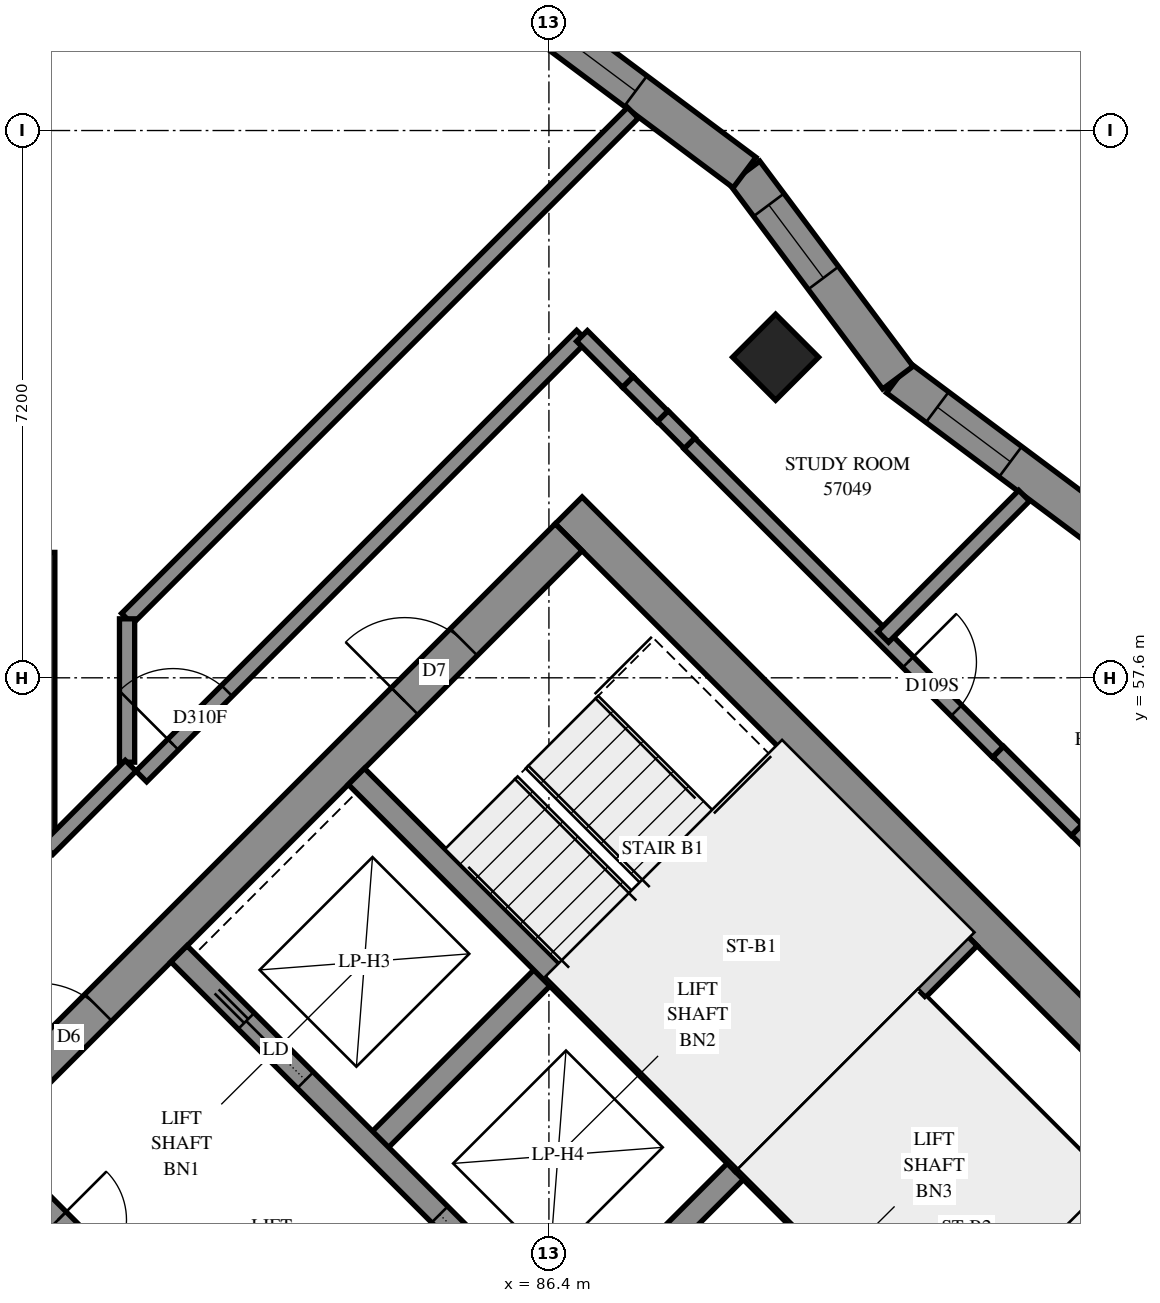
"""IFC4 building model, lengths in metres.
Left out: names, types, materials, properties, quantities, classifications, styles, units other than length and angle.
Written with IfcOpenShell. Run it as: python <this file> out.ifc"""

import sys

from ifc_helpers import new_model, si_unit, direction, frame, frame_2d, origin, origin_2d, place, context, subcontext, project, spatial, polyline, rectangle, outline, extrude, element, fill, save


model = new_model("IFC4")
c1 = context("Model", 3, precision=1e-05, world=origin(), true_north=direction((0.0, 1.0)))
c2 = subcontext(c1, "Body", "Model", "MODEL_VIEW")
j1 = project(units=[si_unit("LENGTHUNIT", "METRE"), si_unit("PLANEANGLEUNIT", "RADIAN")], contexts=[c1])
p1 = place(None, origin())
s1 = spatial("IfcSite", under=j1, at=p1, CompositionType="ELEMENT")
p2 = place(p1, origin())
s2 = spatial("IfcBuilding", under=s1, at=p2, CompositionType="ELEMENT")
p3 = place(p2, frame((0.0, 0.0, 210.0)))
s3 = spatial("IfcBuildingStorey", under=s2, at=p3, CompositionType="ELEMENT", Elevation=210.0)
p4 = place(p3, frame((89.382, 61.818, 0.0), z_axis=(0.0, 0.0, 1.0), x_axis=(0.7071067812, -0.7071067812, 0.0)))
e1 = element("IfcColumn", 1, at=p4, inside=s3, PredefinedType="COLUMN", context=c2, shape_type="SweptSolid", body=[
    extrude(rectangle(XDim=0.8, YDim=0.8, at=origin_2d()), origin(), (0.0, 0.0, 1.0), 3.1),
])
p5 = place(p3, frame((86.66, 59.802, -0.3), z_axis=(0.0, 0.0, 1.0), x_axis=(0.7071067812, -0.7071067812, 0.0)))
e2 = element("IfcWall", 2, at=p5, inside=s3, PredefinedType="SHEAR", context=c2, shape_type="SweptSolid", body=[
    extrude(rectangle(XDim=15.4, YDim=0.5, at=frame_2d((7.7, 0.0))), origin(), (0.0, 0.0, 1.0), 2.7),
])
p6 = place(p5, frame((10.5, 0.0, 0.3)))
e3 = element("IfcOpeningElement", 3, at=p6, cuts=e2, PredefinedType="OPENING", context=c2, shape_type="SweptSolid", body=[
    extrude(rectangle(XDim=0.8, YDim=2.1, at=frame_2d((0.4, 1.05))), frame((0.0, 0.26, 0.0), z_axis=(0.0, -1.0, 0.0), x_axis=(1.0, 0.0, 0.0)), (0.0, 0.0, 1.0), 0.52),
])
p7 = place(p3, frame((76.478, 49.267, -0.3), z_axis=(0.0, 0.0, 1.0), x_axis=(0.7071067812, 0.7071067812, 0.0)))
e4 = element("IfcWall", 4, at=p7, inside=s3, PredefinedType="SHEAR", context=c2, shape_type="SweptSolid", body=[
    extrude(rectangle(XDim=14.4, YDim=0.5, at=frame_2d((7.2, 0.0))), origin(), (0.0, 0.0, 1.0), 2.7),
])
p8 = place(p7, frame((4.55, 0.0, 0.3)))
e5 = element("IfcOpeningElement", 5, at=p8, cuts=e4, PredefinedType="OPENING", context=c2, shape_type="SweptSolid", body=[
    extrude(rectangle(XDim=1.1, YDim=2.1, at=frame_2d((0.55, 1.05))), frame((0.0, 0.26, 0.0), z_axis=(0.0, -1.0, 0.0), x_axis=(1.0, 0.0, 0.0)), (0.0, 0.0, 1.0), 0.52),
])
p9 = place(p7, frame((11.35, 0.0, 0.3)))
e6 = element("IfcOpeningElement", 6, at=p9, cuts=e4, PredefinedType="OPENING", context=c2, shape_type="SweptSolid", body=[
    extrude(rectangle(XDim=1.1, YDim=2.1, at=frame_2d((0.55, 1.05))), frame((0.0, 0.26, 0.0), z_axis=(0.0, -1.0, 0.0), x_axis=(1.0, 0.0, 0.0)), (0.0, 0.0, 1.0), 0.52),
])
p10 = place(p3, frame((84.079, 51.423, 0.0), z_axis=(0.0, 0.0, 1.0), x_axis=(0.7071219326, 0.7070916295, 0.0)))
e7 = element("IfcWall", 7, at=p10, inside=s3, PredefinedType="SOLIDWALL", context=c2, shape_type="SweptSolid", body=[
    extrude(rectangle(XDim=3.3, YDim=0.3, at=frame_2d((1.65, 0.0))), origin(), (0.0, 0.0, 1.0), 3.1),
])
p11 = place(p3, frame((86.625, 48.878, 0.0), z_axis=(0.0, 0.0, 1.0), x_axis=(0.7071067812, 0.7071067812, 0.0)))
e8 = element("IfcWall", 8, at=p11, inside=s3, PredefinedType="SOLIDWALL", context=c2, shape_type="SweptSolid", body=[
    extrude(rectangle(XDim=3.3, YDim=0.3, at=frame_2d((1.65, 0.0))), origin(), (0.0, 0.0, 1.0), 3.1),
])
p12 = place(p3, frame((78.988, 51.423, 0.0), z_axis=(0.0, 0.0, 1.0), x_axis=(0.7071067812, -0.7071067812, 0.0)))
e9 = element("IfcWall", 9, at=p12, inside=s3, PredefinedType="SOLIDWALL", context=c2, shape_type="SweptSolid", body=[
    extrude(rectangle(XDim=14.4, YDim=0.3, at=frame_2d((7.2, 0.0))), origin(), (0.0, 0.0, 1.0), 3.1),
])
p13 = place(p12, frame((1.35, 0.0, 0.0)))
e10 = element("IfcOpeningElement", 10, at=p13, cuts=e9, PredefinedType="OPENING", context=c2, shape_type="SweptSolid", body=[
    extrude(rectangle(XDim=0.9, YDim=2.1, at=frame_2d((0.45, 1.05))), frame((0.0, 0.16, 0.0), z_axis=(0.0, -1.0, 0.0), x_axis=(1.0, 0.0, 0.0)), (0.0, 0.0, 1.0), 0.32),
])
p14 = place(p12, frame((4.95, 0.0, 0.0)))
e11 = element("IfcOpeningElement", 11, at=p14, cuts=e9, PredefinedType="OPENING", context=c2, shape_type="SweptSolid", body=[
    extrude(rectangle(XDim=0.9, YDim=2.1, at=frame_2d((0.45, 1.05))), frame((0.0, 0.16, 0.0), z_axis=(0.0, -1.0, 0.0), x_axis=(1.0, 0.0, 0.0)), (0.0, 0.0, 1.0), 0.32),
])
p15 = place(p12, frame((8.55, 0.0, 0.0)))
e12 = element("IfcOpeningElement", 12, at=p15, cuts=e9, PredefinedType="OPENING", context=c2, shape_type="SweptSolid", body=[
    extrude(rectangle(XDim=0.9, YDim=2.1, at=frame_2d((0.45, 1.05))), frame((0.0, 0.16, 0.0), z_axis=(0.0, -1.0, 0.0), x_axis=(1.0, 0.0, 0.0)), (0.0, 0.0, 1.0), 0.32),
])
p16 = place(p12, frame((12.05, 0.0, 0.0)))
e13 = element("IfcOpeningElement", 13, at=p16, cuts=e9, PredefinedType="OPENING", context=c2, shape_type="SweptSolid", body=[
    extrude(rectangle(XDim=1.1, YDim=2.1, at=frame_2d((0.55, 1.05))), frame((0.0, 0.16, 0.0), z_axis=(0.0, -1.0, 0.0), x_axis=(1.0, 0.0, 0.0)), (0.0, 0.0, 1.0), 0.32),
])
p17 = place(p3, frame((81.534, 53.969, 0.0), z_axis=(0.0, 0.0, 1.0), x_axis=(0.707103309, -0.7071102534, 0.0)))
e14 = element("IfcWall", 14, at=p17, inside=s3, PredefinedType="SOLIDWALL", context=c2, shape_type="SweptSolid", body=[
    extrude(rectangle(XDim=14.4, YDim=0.3, at=frame_2d((7.2, 0.0))), origin(), (0.0, 0.0, 1.0), 3.1),
])
p18 = place(p17, frame((1.25, 0.0, 0.0)))
e15 = element("IfcOpeningElement", 15, at=p18, cuts=e14, PredefinedType="OPENING", context=c2, shape_type="SweptSolid", body=[
    extrude(rectangle(XDim=1.1, YDim=2.1, at=frame_2d((0.55, 1.05))), frame((0.0, 0.16, 0.0), z_axis=(0.0, -1.0, 0.0), x_axis=(1.0, 0.0, 0.0)), (0.0, 0.0, 1.0), 0.32),
])
p19 = place(p17, frame((4.85, 0.0, 0.0)))
e16 = element("IfcOpeningElement", 16, at=p19, cuts=e14, PredefinedType="OPENING", context=c2, shape_type="SweptSolid", body=[
    extrude(rectangle(XDim=1.1, YDim=2.1, at=frame_2d((0.55, 1.05))), frame((0.0, 0.16, 0.0), z_axis=(0.0, -1.0, 0.0), x_axis=(1.0, 0.0, 0.0)), (0.0, 0.0, 1.0), 0.32),
])
p20 = place(p17, frame((8.45, 0.0, 0.0)))
e17 = element("IfcOpeningElement", 17, at=p20, cuts=e14, PredefinedType="OPENING", context=c2, shape_type="SweptSolid", body=[
    extrude(rectangle(XDim=1.1, YDim=2.1, at=frame_2d((0.55, 1.05))), frame((0.0, 0.16, 0.0), z_axis=(0.0, -1.0, 0.0), x_axis=(1.0, 0.0, 0.0)), (0.0, 0.0, 1.0), 0.32),
])
p21 = place(p17, frame((12.05, 0.0, 0.0)))
e18 = element("IfcOpeningElement", 18, at=p21, cuts=e14, PredefinedType="OPENING", context=c2, shape_type="SweptSolid", body=[
    extrude(rectangle(XDim=1.1, YDim=2.1, at=frame_2d((0.55, 1.05))), frame((0.0, 0.16, 0.0), z_axis=(0.0, -1.0, 0.0), x_axis=(1.0, 0.0, 0.0)), (0.0, 0.0, 1.0), 0.32),
])
for number, where, z_axis, x_axis in (
    (19, (83.867, 56.302, 0.0), (0.0, 0.0, 1.0), (0.707, -0.707, 0.0)),
    (20, (88.958, 51.211, 0.0), (0.0, 0.0, 1.0), (0.707, -0.707, 0.0)),
):
    element("IfcWall", number, at=place(p3, frame(where, z_axis=z_axis, x_axis=x_axis)), inside=s3, PredefinedType="SOLIDWALL", context=c2, shape_type="SweptSolid", body=[
        extrude(rectangle(XDim=7.2, YDim=0.3, at=frame_2d((3.6, 0.0))), origin(), (0.0, 0.0, 1.0), 3.1),
    ])
p22 = place(p3, frame((88.958, 51.211, 0.0), z_axis=(0.0, 0.0, 1.0), x_axis=(0.7071067812, 0.7071067812, 0.0)))
e21 = element("IfcWall", 21, at=p22, inside=s3, PredefinedType="SOLIDWALL", context=c2, shape_type="SweptSolid", body=[
    extrude(rectangle(XDim=4.2, YDim=0.3, at=frame_2d((2.1, 0.0))), origin(), (0.0, 0.0, 1.0), 3.1),
])
p23 = place(p3, frame((93.69, 59.532, 0.0), z_axis=(0.0, 0.0, 1.0), x_axis=(-0.8009997286, 0.5986647099, 0.0)))
e22 = element("IfcWall", 22, at=p23, inside=s3, PredefinedType="SOLIDWALL", context=c2, shape_type="SweptSolid", body=[
    extrude(outline(polyline([(-0.036, -0.25), (3.333, -0.25), (3.405, 0.25), (0.036, 0.25), (-0.036, -0.25)])), origin(), (0.0, 0.0, 1.0), 3.1),
])
p24 = place(p23, frame((1.521, 0.0, 0.45)))
e23 = element("IfcOpeningElement", 23, at=p24, cuts=e22, PredefinedType="OPENING", context=c2, shape_type="SweptSolid", body=[
    extrude(rectangle(XDim=1.2, YDim=2.5, at=frame_2d((0.6, 1.25))), frame((0.0, 0.26, 0.0), z_axis=(0.0, -1.0, 0.0), x_axis=(1.0, 0.0, 0.0)), (0.0, 0.0, 1.0), 0.52),
])
p25 = place(p3, frame((90.991, 61.549, 0.0), z_axis=(0.0, 0.0, 1.0), x_axis=(-0.5986837527, 0.8009854957, 0.0)))
e24 = element("IfcWall", 24, at=p25, inside=s3, PredefinedType="SOLIDWALL", context=c2, shape_type="SweptSolid", body=[
    extrude(outline(polyline([(0.036, -0.25), (3.405, -0.25), (3.333, 0.25), (-0.036, 0.25), (0.036, -0.25)])), origin(), (0.0, 0.0, 1.0), 3.1),
])
p26 = place(p25, frame((1.637, 0.0, 0.45)))
e25 = element("IfcOpeningElement", 25, at=p26, cuts=e24, PredefinedType="OPENING", context=c2, shape_type="SweptSolid", body=[
    extrude(rectangle(XDim=1.2, YDim=2.5, at=frame_2d((0.6, 1.25))), frame((0.0, 0.26, 0.0), z_axis=(0.0, -1.0, 0.0), x_axis=(1.0, 0.0, 0.0)), (0.0, 0.0, 1.0), 0.52),
])
p27 = place(p3, frame((88.974, 64.248, 0.0), z_axis=(0.0, 0.0, 1.0), x_axis=(-0.8009890906, 0.598678943, 0.0)))
e26 = element("IfcWall", 26, at=p27, inside=s3, PredefinedType="SOLIDWALL", context=c2, shape_type="SweptSolid", body=[
    extrude(outline(polyline([(-0.036, -0.25), (3.333, -0.25), (3.405, 0.25), (0.036, 0.25), (-0.036, -0.25)])), origin(), (0.0, 0.0, 1.0), 3.1),
])
p28 = place(p27, frame((1.789, 0.0, 0.45)))
e27 = element("IfcOpeningElement", 27, at=p28, cuts=e26, PredefinedType="OPENING", context=c2, shape_type="SweptSolid", body=[
    extrude(rectangle(XDim=1.2, YDim=2.5, at=frame_2d((0.6, 1.25))), frame((0.0, 0.26, 0.0), z_axis=(0.0, -1.0, 0.0), x_axis=(1.0, 0.0, 0.0)), (0.0, 0.0, 1.0), 0.52),
])
p29 = place(p3, frame((91.313, 53.354, 0.0), z_axis=(0.0, 0.0, 1.0), x_axis=(0.7071140275, -0.7070995348, 0.0)))
e28 = element("IfcWall", 28, at=p29, inside=s3, PredefinedType="PARTITIONING", context=c2, shape_type="SweptSolid", body=[
    extrude(rectangle(XDim=6.9, YDim=0.15, at=frame_2d((3.45, 0.0))), origin(), (0.0, 0.0, 1.0), 3.1),
])
p30 = place(p3, frame((80.849, 58.377, 0.0), z_axis=(0.0, 0.0, 1.0), x_axis=(0.7071067812, 0.7071067812, 0.0)))
e29 = element("IfcWall", 29, at=p30, inside=s3, PredefinedType="PARTITIONING", context=c2, shape_type="SweptSolid", body=[
    extrude(rectangle(XDim=9.413, YDim=0.2, at=frame_2d((4.707, 0.0))), origin(), (0.0, 0.0, 1.0), 3.1),
])
p31 = place(p3, frame((93.346, 55.599, 0.0), z_axis=(0.0, 0.0, 1.0), x_axis=(0.7071067812, -0.7071067812, 0.0)))
e30 = element("IfcWall", 30, at=p31, inside=s3, PredefinedType="PARTITIONING", context=c2, shape_type="SweptSolid", body=[
    extrude(rectangle(XDim=9.201, YDim=0.2, at=frame_2d((4.601, 0.0))), origin(), (0.0, 0.0, 1.0), 3.1),
])
p32 = place(p3, frame((81.037, 56.303, 0.0), z_axis=(0.0, 0.0, 1.0), x_axis=(0.7071067812, 0.7071067812, 0.0)))
e31 = element("IfcWall", 31, at=p32, inside=s3, PredefinedType="PARTITIONING", context=c2, shape_type="SweptSolid", body=[
    extrude(rectangle(XDim=8.2, YDim=0.2, at=frame_2d((4.1, 0.0))), origin(), (0.0, 0.0, 1.0), 3.1),
])
p33 = place(p32, frame((0.592, 0.0, 0.0)))
e32 = element("IfcOpeningElement", 32, at=p33, cuts=e31, PredefinedType="OPENING", context=c2, shape_type="SweptSolid", body=[
    extrude(rectangle(XDim=1.0, YDim=2.1, at=frame_2d((0.5, 1.05))), frame((0.0, 0.11, 0.0), z_axis=(0.0, -1.0, 0.0), x_axis=(1.0, 0.0, 0.0)), (0.0, 0.0, 1.0), 0.22),
])
p34 = place(p3, frame((88.247, 60.683, 0.0), z_axis=(0.0, 0.0, 1.0), x_axis=(0.7071067812, -0.7071067812, 0.0)))
e33 = element("IfcWall", 33, at=p34, inside=s3, PredefinedType="PARTITIONING", context=c2, shape_type="SweptSolid", body=[
    extrude(rectangle(XDim=5.742, YDim=0.2, at=frame_2d((2.871, 0.0))), origin(), (0.0, 0.0, 1.0), 3.1),
])
p35 = place(p34, frame((4.069, 0.0, 0.0)))
e34 = element("IfcOpeningElement", 34, at=p35, cuts=e33, PredefinedType="OPENING", context=c2, shape_type="SweptSolid", body=[
    extrude(rectangle(XDim=0.9, YDim=2.1, at=frame_2d((0.45, 1.05))), frame((0.0, 0.11, 0.0), z_axis=(0.0, -1.0, 0.0), x_axis=(1.0, 0.0, 0.0)), (0.0, 0.0, 1.0), 0.22),
])
p36 = place(p3, frame((79.8, 55.35, 0.0), z_axis=(0.0, 0.0, 1.0), x_axis=(0.0, 1.0, 0.0)))
e35 = element("IfcWall", 35, at=p36, inside=s3, PredefinedType="PARTITIONING", context=c2, shape_type="SweptSolid", body=[
    extrude(rectangle(XDim=3.9, YDim=0.2, at=frame_2d((1.95, 0.0))), origin(), (0.0, 0.0, 1.0), 3.1),
])
p37 = place(p3, frame((90.797, 58.139, 0.0), z_axis=(0.0, 0.0, 1.0), x_axis=(0.7066493538, 0.7075639129, 0.0)))
e36 = element("IfcWall", 36, at=p37, inside=s3, PredefinedType="PARTITIONING", context=c2, shape_type="SweptSolid", body=[
    extrude(rectangle(XDim=2.624, YDim=0.2, at=frame_2d((1.312, 0.0))), origin(), (0.0, 0.0, 1.0), 3.1),
])
p38 = place(p3, frame((80.85, 56.49, 0.0), z_axis=(0.0, 0.0, 1.0), x_axis=(0.0, 1.0, 0.0)))
e37 = element("IfcWall", 37, at=p38, inside=s3, PredefinedType="PARTITIONING", context=c2, shape_type="SweptSolid", body=[
    extrude(rectangle(XDim=1.886, YDim=0.2, at=frame_2d((0.943, 0.0))), origin(), (0.0, 0.0, 1.0), 3.1),
])
p39 = place(p3, frame((79.803, 55.347, 0.0), z_axis=(0.0, 0.0, 1.0), x_axis=(0.706460727, 0.7077522457, 0.0)))
e38 = element("IfcWall", 38, at=p39, inside=s3, PredefinedType="PARTITIONING", context=c2, shape_type="SweptSolid", body=[
    extrude(rectangle(XDim=1.549, YDim=0.2, at=frame_2d((0.774, 0.0))), origin(), (0.0, 0.0, 1.0), 3.1),
])
p40 = place(p3, frame((92.311, 56.627, 0.0), z_axis=(0.0, 0.0, 1.0), x_axis=(0.7077922938, -0.7064206033, 0.0)))
e39 = element("IfcWall", 39, at=p40, inside=s3, PredefinedType="PARTITIONING", context=c2, shape_type="SweptSolid", body=[
    extrude(rectangle(XDim=1.458, YDim=0.2, at=frame_2d((0.729, 0.0))), origin(), (0.0, 0.0, 1.0), 3.1),
])
p41 = place(p3, frame((86.835, 62.097, 0.0), z_axis=(0.0, 0.0, 1.0), x_axis=(0.7059370453, -0.7082745852, 0.0)))
e40 = element("IfcWall", 40, at=p41, inside=s3, PredefinedType="PARTITIONING", context=c2, shape_type="SweptSolid", body=[
    extrude(rectangle(XDim=0.856, YDim=0.2, at=frame_2d((0.428, 0.0))), origin(), (0.0, 0.0, 1.0), 3.1),
])
p42 = place(p3, frame((87.44, 61.492, 0.0), z_axis=(0.0, 0.0, 1.0), x_axis=(0.7086591505, -0.7055509963, 0.0)))
e41 = element("IfcWall", 41, at=p42, inside=s3, PredefinedType="PARTITIONING", context=c2, shape_type="SweptSolid", body=[
    extrude(rectangle(XDim=0.643, YDim=0.2, at=frame_2d((0.322, 0.0))), origin(), (0.0, 0.0, 1.0), 3.1),
])
p43 = place(p3, frame((87.899, 61.041, 0.0), z_axis=(0.0, 0.0, 1.0), x_axis=(0.7051008166, -0.7091070712, 0.0)))
e42 = element("IfcWall", 42, at=p43, inside=s3, PredefinedType="PARTITIONING", context=c2, shape_type="SweptSolid", body=[
    extrude(rectangle(XDim=0.499, YDim=0.2, at=frame_2d((0.25, 0.0))), origin(), (0.0, 0.0, 1.0), 3.1),
])
p44 = place(p24, origin())
e43 = element("IfcWindow", 43, at=p44, inside=s3, PartitioningType="SINGLE_PANEL", PredefinedType="WINDOW", context=c2, shape_type="SweptSolid", body=[
    extrude(rectangle(XDim=1.2, YDim=2.5, at=frame_2d((0.6, 1.25))), frame((0.0, 0.18, 0.0), z_axis=(0.0, -1.0, 0.0), x_axis=(1.0, 0.0, 0.0)), (0.0, 0.0, 1.0), 0.06),
])
fill(e23, e43)
p45 = place(p26, origin())
e44 = element("IfcWindow", 44, at=p45, inside=s3, PartitioningType="SINGLE_PANEL", PredefinedType="WINDOW", context=c2, shape_type="SweptSolid", body=[
    extrude(rectangle(XDim=1.2, YDim=2.5, at=frame_2d((0.6, 1.25))), frame((0.0, 0.18, 0.0), z_axis=(0.0, -1.0, 0.0), x_axis=(1.0, 0.0, 0.0)), (0.0, 0.0, 1.0), 0.06),
])
fill(e25, e44)
p46 = place(p28, origin())
e45 = element("IfcWindow", 45, at=p46, inside=s3, PartitioningType="SINGLE_PANEL", PredefinedType="WINDOW", context=c2, shape_type="SweptSolid", body=[
    extrude(rectangle(XDim=1.2, YDim=2.5, at=frame_2d((0.6, 1.25))), frame((0.0, 0.18, 0.0), z_axis=(0.0, -1.0, 0.0), x_axis=(1.0, 0.0, 0.0)), (0.0, 0.0, 1.0), 0.06),
])
fill(e27, e45)
p47 = place(p8, origin())
e46 = element("IfcDoor", 46, at=p47, inside=s3, OperationType="DOUBLE_DOOR_SINGLE_SWING", PredefinedType="DOOR", context=c2, shape_type="SweptSolid", body=[
    extrude(rectangle(XDim=1.1, YDim=2.1, at=frame_2d((0.55, 1.05))), frame((0.0, 0.025, 0.0), z_axis=(0.0, -1.0, 0.0), x_axis=(1.0, 0.0, 0.0)), (0.0, 0.0, 1.0), 0.05),
])
fill(e5, e46)
p48 = place(p9, origin())
e47 = element("IfcDoor", 47, at=p48, inside=s3, OperationType="SINGLE_SWING_LEFT", PredefinedType="DOOR", context=c2, shape_type="SweptSolid", body=[
    extrude(rectangle(XDim=1.1, YDim=2.1, at=frame_2d((0.55, 1.05))), frame((0.0, 0.025, 0.0), z_axis=(0.0, -1.0, 0.0), x_axis=(1.0, 0.0, 0.0)), (0.0, 0.0, 1.0), 0.05),
])
fill(e6, e47)
p49 = place(p13, origin())
e48 = element("IfcDoor", 48, at=p49, inside=s3, OperationType="SINGLE_SWING_LEFT", PredefinedType="DOOR", context=c2, shape_type="SweptSolid", body=[
    extrude(rectangle(XDim=0.9, YDim=2.1, at=frame_2d((0.45, 1.05))), frame((0.0, 0.025, 0.0), z_axis=(0.0, -1.0, 0.0), x_axis=(1.0, 0.0, 0.0)), (0.0, 0.0, 1.0), 0.05),
])
fill(e10, e48)
p50 = place(p18, origin())
e49 = element("IfcDoor", 49, at=p50, inside=s3, OperationType="SLIDING_TO_LEFT", PredefinedType="DOOR", context=c2, shape_type="SweptSolid", body=[
    extrude(rectangle(XDim=1.1, YDim=2.1, at=frame_2d((0.55, 1.05))), frame((0.0, 0.025, 0.0), z_axis=(0.0, -1.0, 0.0), x_axis=(1.0, 0.0, 0.0)), (0.0, 0.0, 1.0), 0.05),
])
fill(e15, e49)
p51 = place(p19, origin())
e50 = element("IfcDoor", 50, at=p51, inside=s3, OperationType="SLIDING_TO_RIGHT", PredefinedType="DOOR", context=c2, shape_type="SweptSolid", body=[
    extrude(rectangle(XDim=1.1, YDim=2.1, at=frame_2d((0.55, 1.05))), frame((0.0, 0.025, 0.0), z_axis=(0.0, -1.0, 0.0), x_axis=(1.0, 0.0, 0.0)), (0.0, 0.0, 1.0), 0.05),
])
fill(e16, e50)
p52 = place(p33, origin())
e51 = element("IfcDoor", 51, at=p52, inside=s3, OperationType="SINGLE_SWING_RIGHT", PredefinedType="DOOR", context=c2, shape_type="SweptSolid", body=[
    extrude(rectangle(XDim=1.0, YDim=2.1, at=frame_2d((0.5, 1.05))), frame((0.0, 0.025, 0.0), z_axis=(0.0, -1.0, 0.0), x_axis=(1.0, 0.0, 0.0)), (0.0, 0.0, 1.0), 0.05),
])
fill(e32, e51)
p53 = place(p35, origin())
e52 = element("IfcDoor", 52, at=p53, inside=s3, OperationType="SINGLE_SWING_RIGHT", PredefinedType="DOOR", context=c2, shape_type="SweptSolid", body=[
    extrude(rectangle(XDim=0.9, YDim=2.1, at=frame_2d((0.45, 1.05))), frame((0.0, 0.025, 0.0), z_axis=(0.0, -1.0, 0.0), x_axis=(1.0, 0.0, 0.0)), (0.0, 0.0, 1.0), 0.05),
])
fill(e34, e52)
save(model, sys.argv[1])
